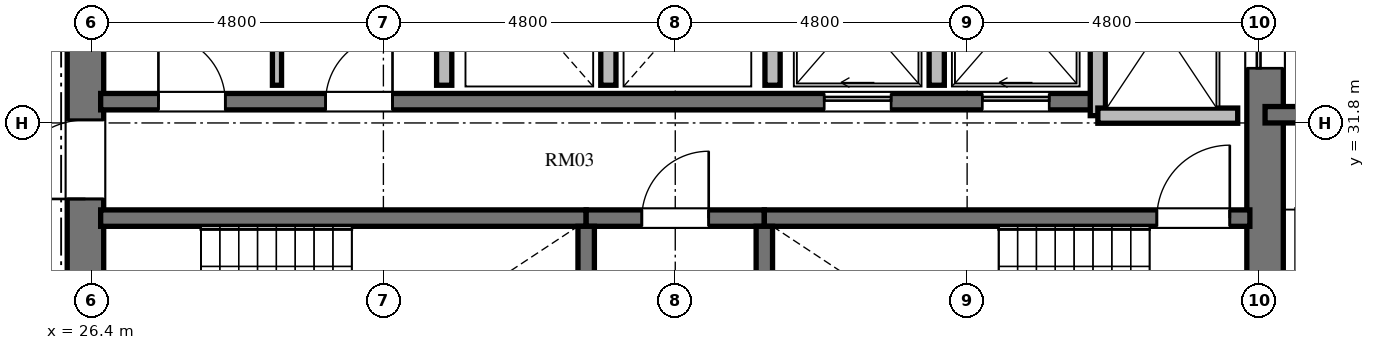
"""IFC4 building model, lengths in metres.
Left out: names, types, materials, properties, quantities, classifications, styles, units other than length and angle.
Written with IfcOpenShell. Run it as: python <this file> out.ifc"""

import sys

from ifc_helpers import new_model, si_unit, direction, frame, frame_2d, origin, place, context, subcontext, project, spatial, rectangle, extrude, element, fill, save


model = new_model("IFC4")
c1 = context("Model", 3, precision=1e-05, world=origin(), true_north=direction((0.0, 1.0)))
c2 = subcontext(c1, "Body", "Model", "MODEL_VIEW")
j1 = project(units=[si_unit("LENGTHUNIT", "METRE"), si_unit("PLANEANGLEUNIT", "RADIAN")], contexts=[c1])
p1 = place(None, origin())
s1 = spatial("IfcSite", under=j1, at=p1, CompositionType="ELEMENT")
p2 = place(p1, origin())
s2 = spatial("IfcBuilding", under=s1, at=p2, CompositionType="ELEMENT")
p3 = place(p2, frame((0.0, 0.0, 189.36)))
s3 = spatial("IfcBuildingStorey", under=s2, at=p3, CompositionType="ELEMENT", Elevation=189.36)
p4 = place(p3, frame((26.3, 20.95, 0.0), z_axis=(0.0, 0.0, 1.0), x_axis=(0.0, 1.0, 0.0)))
e1 = element("IfcWall", 1, at=p4, inside=s3, PredefinedType="SHEAR", context=c2, shape_type="SweptSolid", body=[
    extrude(rectangle(XDim=14.1, YDim=0.6, at=frame_2d((7.05, 0.0))), origin(), (0.0, 0.0, 1.0), 5.472),
])
p5 = place(p4, frame((6.5, 0.0, 0.0)))
e2 = element("IfcOpeningElement", 2, at=p5, cuts=e1, PredefinedType="OPENING", context=c2, shape_type="SweptSolid", body=[
    extrude(rectangle(XDim=1.2, YDim=2.15, at=frame_2d((0.6, 1.075))), frame((0.0, 0.31, 0.0), z_axis=(0.0, -1.0, 0.0), x_axis=(1.0, 0.0, 0.0)), (0.0, 0.0, 1.0), 0.62),
])
p6 = place(p4, frame((9.6, 0.0, 0.0)))
e3 = element("IfcOpeningElement", 3, at=p6, cuts=e1, PredefinedType="OPENING", context=c2, shape_type="SweptSolid", body=[
    extrude(rectangle(XDim=1.3, YDim=2.2, at=frame_2d((0.65, 1.1))), frame((0.0, 0.31, 0.0), z_axis=(0.0, -1.0, 0.0), x_axis=(1.0, 0.0, 0.0)), (0.0, 0.0, 1.0), 0.62),
])
p7 = place(p4, frame((3.26, 0.0, 0.0)))
e4 = element("IfcOpeningElement", 4, at=p7, cuts=e1, PredefinedType="OPENING", context=c2, shape_type="SweptSolid", body=[
    extrude(rectangle(XDim=1.3, YDim=2.2, at=frame_2d((0.65, 1.1))), frame((0.0, 0.31, 0.0), z_axis=(0.0, -1.0, 0.0), x_axis=(1.0, 0.0, 0.0)), (0.0, 0.0, 1.0), 0.62),
])
p8 = place(p3, frame((45.7, 20.95, 0.0), z_axis=(0.0, 0.0, 1.0), x_axis=(0.0, 1.0, 0.0)))
e5 = element("IfcWall", 5, at=p8, inside=s3, PredefinedType="SHEAR", context=c2, shape_type="SweptSolid", body=[
    extrude(rectangle(XDim=14.1, YDim=0.6, at=frame_2d((7.05, 0.0))), origin(), (0.0, 0.0, 1.0), 5.472),
])
p9 = place(p8, frame((11.75, 0.0, 0.0)))
e6 = element("IfcOpeningElement", 6, at=p9, cuts=e5, PredefinedType="OPENING", context=c2, shape_type="SweptSolid", body=[
    extrude(rectangle(XDim=1.4, YDim=2.3, at=frame_2d((0.7, 1.15))), frame((0.0, 0.31, 0.0), z_axis=(0.0, -1.0, 0.0), x_axis=(1.0, 0.0, 0.0)), (0.0, 0.0, 1.0), 0.62),
])
p10 = place(p8, frame((0.95, 0.0, 0.0)))
e7 = element("IfcOpeningElement", 7, at=p10, cuts=e5, PredefinedType="OPENING", context=c2, shape_type="SweptSolid", body=[
    extrude(rectangle(XDim=1.4, YDim=2.3, at=frame_2d((0.7, 1.15))), frame((0.0, 0.31, 0.0), z_axis=(0.0, -1.0, 0.0), x_axis=(1.0, 0.0, 0.0)), (0.0, 0.0, 1.0), 0.62),
])
p11 = place(p3, frame((26.55, 30.235, 0.0), z_axis=(0.0, 0.0, 1.0), x_axis=(1.0, 0.0, 0.0)))
e8 = element("IfcWall", 8, at=p11, inside=s3, PredefinedType="SHEAR", context=c2, shape_type="SweptSolid", body=[
    extrude(rectangle(XDim=7.985, YDim=0.27, at=frame_2d((3.992, 0.0))), origin(), (0.0, 0.0, 1.0), 5.472),
])
p12 = place(p3, frame((34.535, 30.235, 0.0), z_axis=(0.0, 0.0, 1.0), x_axis=(1.0, 0.0, 0.0)))
e9 = element("IfcWall", 9, at=p12, inside=s3, PredefinedType="SHEAR", context=c2, shape_type="SweptSolid", body=[
    extrude(rectangle(XDim=2.93, YDim=0.27, at=frame_2d((1.465, 0.0))), origin(), (0.0, 0.0, 1.0), 5.472),
])
p13 = place(p12, frame((0.915, 0.0, 0.0)))
e10 = element("IfcOpeningElement", 10, at=p13, cuts=e9, PredefinedType="OPENING", context=c2, shape_type="SweptSolid", body=[
    extrude(rectangle(XDim=1.1, YDim=2.15, at=frame_2d((0.55, 1.075))), frame((0.0, 0.145, 0.0), z_axis=(0.0, -1.0, 0.0), x_axis=(1.0, 0.0, 0.0)), (0.0, 0.0, 1.0), 0.29),
])
p14 = place(p3, frame((37.465, 30.235, 0.0), z_axis=(0.0, 0.0, 1.0), x_axis=(1.0, 0.0, 0.0)))
e11 = element("IfcWall", 11, at=p14, inside=s3, PredefinedType="SHEAR", context=c2, shape_type="SweptSolid", body=[
    extrude(rectangle(XDim=7.985, YDim=0.27, at=frame_2d((3.992, 0.0))), origin(), (0.0, 0.0, 1.0), 5.472),
])
p15 = place(p14, frame((6.455, 0.0, 0.0)))
e12 = element("IfcOpeningElement", 12, at=p15, cuts=e11, PredefinedType="OPENING", context=c2, shape_type="SweptSolid", body=[
    extrude(rectangle(XDim=1.2, YDim=2.15, at=frame_2d((0.6, 1.075))), frame((0.0, 0.145, 0.0), z_axis=(0.0, -1.0, 0.0), x_axis=(1.0, 0.0, 0.0)), (0.0, 0.0, 1.0), 0.29),
])
for number, where, z_axis, x_axis in (
    (13, (34.535, 26.02, 0.0), (0.0, 0.0, 1.0), (0.0, 1.0, 0.0)),
    (14, (37.465, 26.02, 0.0), (0.0, 0.0, 1.0), (0.0, 1.0, 0.0)),
):
    element("IfcWall", number, at=place(p3, frame(where, z_axis=z_axis, x_axis=x_axis)), inside=s3, PredefinedType="SHEAR", context=c2, shape_type="SweptSolid", body=[
        extrude(rectangle(XDim=4.08, YDim=0.27, at=frame_2d((2.04, 0.0))), origin(), (0.0, 0.0, 1.0), 5.472),
    ])
p16 = place(p3, frame((26.55, 32.15, 0.0), z_axis=(0.0, 0.0, 1.0), x_axis=(1.0, 0.0, 0.0)))
e15 = element("IfcWall", 15, at=p16, inside=s3, PredefinedType="SHEAR", context=c2, shape_type="SweptSolid", body=[
    extrude(rectangle(XDim=16.4, YDim=0.27, at=frame_2d((8.2, 0.0))), origin(), (0.0, 0.0, 1.0), 5.472),
])
p17 = place(p16, frame((0.95, 0.0, 0.0)))
e16 = element("IfcOpeningElement", 16, at=p17, cuts=e15, PredefinedType="OPENING", context=c2, shape_type="SweptSolid", body=[
    extrude(rectangle(XDim=1.1, YDim=2.15, at=frame_2d((0.55, 1.075))), frame((0.0, 0.145, 0.0), z_axis=(0.0, -1.0, 0.0), x_axis=(1.0, 0.0, 0.0)), (0.0, 0.0, 1.0), 0.29),
])
p18 = place(p16, frame((3.7, 0.0, 0.0)))
e17 = element("IfcOpeningElement", 17, at=p18, cuts=e15, PredefinedType="OPENING", context=c2, shape_type="SweptSolid", body=[
    extrude(rectangle(XDim=1.1, YDim=2.15, at=frame_2d((0.55, 1.075))), frame((0.0, 0.145, 0.0), z_axis=(0.0, -1.0, 0.0), x_axis=(1.0, 0.0, 0.0)), (0.0, 0.0, 1.0), 0.29),
])
p19 = place(p16, frame((11.9, 0.0, 0.0)))
e18 = element("IfcOpeningElement", 18, at=p19, cuts=e15, PredefinedType="OPENING", context=c2, shape_type="SweptSolid", body=[
    extrude(rectangle(XDim=1.1, YDim=2.2, at=frame_2d((0.55, 1.1))), frame((0.0, 0.145, 0.0), z_axis=(0.0, -1.0, 0.0), x_axis=(1.0, 0.0, 0.0)), (0.0, 0.0, 1.0), 0.29),
])
p20 = place(p16, frame((14.5, 0.0, 0.0)))
e19 = element("IfcOpeningElement", 19, at=p20, cuts=e15, PredefinedType="OPENING", context=c2, shape_type="SweptSolid", body=[
    extrude(rectangle(XDim=1.1, YDim=2.2, at=frame_2d((0.55, 1.1))), frame((0.0, 0.145, 0.0), z_axis=(0.0, -1.0, 0.0), x_axis=(1.0, 0.0, 0.0)), (0.0, 0.0, 1.0), 0.29),
])
p21 = place(p3, frame((42.95, 31.92, 0.0), z_axis=(0.0, 0.0, 1.0), x_axis=(0.0, 1.0, 0.0)))
e20 = element("IfcWall", 20, at=p21, inside=s3, PredefinedType="SOLIDWALL", context=c2, shape_type="SweptSolid", body=[
    extrude(rectangle(XDim=3.18, YDim=0.25, at=frame_2d((1.59, 0.0))), origin(), (0.0, 0.0, 1.0), 5.022),
])
p22 = place(p3, frame((42.95, 31.92, 0.0), z_axis=(0.0, 0.0, 1.0), x_axis=(1.0, 0.0, 0.0)))
e21 = element("IfcWall", 21, at=p22, inside=s3, PredefinedType="SOLIDWALL", context=c2, shape_type="SweptSolid", body=[
    extrude(rectangle(XDim=2.3, YDim=0.25, at=frame_2d((1.15, 0.0))), origin(), (0.0, 0.0, 1.0), 5.022),
])
for number, where, z_axis, x_axis in (
    (22, (32.2, 32.42, 0.0), (0.0, 0.0, 1.0), (0.0, 1.0, 0.0)),
    (23, (34.9, 32.42, 0.0), (0.0, 0.0, 1.0), (0.0, 1.0, 0.0)),
    (24, (37.6, 32.42, 0.0), (0.0, 0.0, 1.0), (0.0, 1.0, 0.0)),
    (25, (40.3, 32.42, 0.0), (0.0, 0.0, 1.0), (0.0, 1.0, 0.0)),
):
    element("IfcWall", number, at=place(p3, frame(where, z_axis=z_axis, x_axis=x_axis)), inside=s3, PredefinedType="SOLIDWALL", context=c2, shape_type="SweptSolid", body=[
        extrude(rectangle(XDim=2.68, YDim=0.25, at=frame_2d((1.34, 0.0))), origin(), (0.0, 0.0, 1.0), 5.022),
    ])
p23 = place(p3, frame((29.45, 32.42, 0.0), z_axis=(0.0, 0.0, 1.0), x_axis=(0.0, 1.0, 0.0)))
e26 = element("IfcWall", 26, at=p23, inside=s3, PredefinedType="PARTITIONING", context=c2, shape_type="SweptSolid", body=[
    extrude(rectangle(XDim=2.68, YDim=0.15, at=frame_2d((1.34, 0.0))), origin(), (0.0, 0.0, 1.0), 5.022),
])
p24 = place(p3, frame((45.7, 31.935, 0.0), z_axis=(0.0, 0.0, 1.0), x_axis=(1.0, 0.0, 0.0)))
e27 = element("IfcWall", 27, at=p24, inside=s3, PredefinedType="SHEAR", context=c2, shape_type="SweptSolid", body=[
    extrude(rectangle(XDim=4.715, YDim=0.27, at=frame_2d((2.357, 0.0))), origin(), (0.0, 0.0, 1.0), 5.472),
])
p25 = place(p15, origin())
e28 = element("IfcDoor", 28, at=p25, inside=s3, OperationType="SINGLE_SWING_RIGHT", PredefinedType="DOOR", context=c2, shape_type="SweptSolid", body=[
    extrude(rectangle(XDim=1.2, YDim=2.15, at=frame_2d((0.6, 1.075))), frame((0.0, 0.025, 0.0), z_axis=(0.0, -1.0, 0.0), x_axis=(1.0, 0.0, 0.0)), (0.0, 0.0, 1.0), 0.05),
])
fill(e12, e28)
p26 = place(p13, origin())
e29 = element("IfcDoor", 29, at=p26, inside=s3, OperationType="SINGLE_SWING_RIGHT", PredefinedType="DOOR", context=c2, shape_type="SweptSolid", body=[
    extrude(rectangle(XDim=1.1, YDim=2.15, at=frame_2d((0.55, 1.075))), frame((0.0, 0.025, 0.0), z_axis=(0.0, -1.0, 0.0), x_axis=(1.0, 0.0, 0.0)), (0.0, 0.0, 1.0), 0.05),
])
fill(e10, e29)
p27 = place(p6, origin())
e30 = element("IfcDoor", 30, at=p27, inside=s3, OperationType="SINGLE_SWING_LEFT", PredefinedType="DOOR", context=c2, shape_type="SweptSolid", body=[
    extrude(rectangle(XDim=1.3, YDim=2.2, at=frame_2d((0.65, 1.1))), frame((0.0, 0.025, 0.0), z_axis=(0.0, -1.0, 0.0), x_axis=(1.0, 0.0, 0.0)), (0.0, 0.0, 1.0), 0.05),
])
fill(e3, e30)
p28 = place(p17, origin())
e31 = element("IfcDoor", 31, at=p28, inside=s3, OperationType="SINGLE_SWING_LEFT", PredefinedType="DOOR", context=c2, shape_type="SweptSolid", body=[
    extrude(rectangle(XDim=1.1, YDim=2.15, at=frame_2d((0.55, 1.075))), frame((0.0, 0.025, 0.0), z_axis=(0.0, -1.0, 0.0), x_axis=(1.0, 0.0, 0.0)), (0.0, 0.0, 1.0), 0.05),
])
fill(e16, e31)
p29 = place(p18, origin())
e32 = element("IfcDoor", 32, at=p29, inside=s3, OperationType="SINGLE_SWING_RIGHT", PredefinedType="DOOR", context=c2, shape_type="SweptSolid", body=[
    extrude(rectangle(XDim=1.1, YDim=2.15, at=frame_2d((0.55, 1.075))), frame((0.0, 0.025, 0.0), z_axis=(0.0, -1.0, 0.0), x_axis=(1.0, 0.0, 0.0)), (0.0, 0.0, 1.0), 0.05),
])
fill(e17, e32)
p30 = place(p19, origin())
e33 = element("IfcDoor", 33, at=p30, inside=s3, OperationType="SLIDING_TO_LEFT", PredefinedType="DOOR", context=c2, shape_type="SweptSolid", body=[
    extrude(rectangle(XDim=1.1, YDim=2.2, at=frame_2d((0.55, 1.1))), frame((0.0, 0.025, 0.0), z_axis=(0.0, -1.0, 0.0), x_axis=(1.0, 0.0, 0.0)), (0.0, 0.0, 1.0), 0.05),
])
fill(e18, e33)
p31 = place(p20, origin())
e34 = element("IfcDoor", 34, at=p31, inside=s3, OperationType="SLIDING_TO_LEFT", PredefinedType="DOOR", context=c2, shape_type="SweptSolid", body=[
    extrude(rectangle(XDim=1.1, YDim=2.2, at=frame_2d((0.55, 1.1))), frame((0.0, 0.025, 0.0), z_axis=(0.0, -1.0, 0.0), x_axis=(1.0, 0.0, 0.0)), (0.0, 0.0, 1.0), 0.05),
])
fill(e19, e34)
p32 = place(p9, origin())
e35 = element("IfcDoor", 35, at=p32, inside=s3, OperationType="SLIDING_TO_LEFT", PredefinedType="DOOR", context=c2, shape_type="SweptSolid", body=[
    extrude(rectangle(XDim=1.4, YDim=2.3, at=frame_2d((0.7, 1.15))), frame((0.0, 0.025, 0.0), z_axis=(0.0, -1.0, 0.0), x_axis=(1.0, 0.0, 0.0)), (0.0, 0.0, 1.0), 0.05),
])
fill(e6, e35)
save(model, sys.argv[1])
